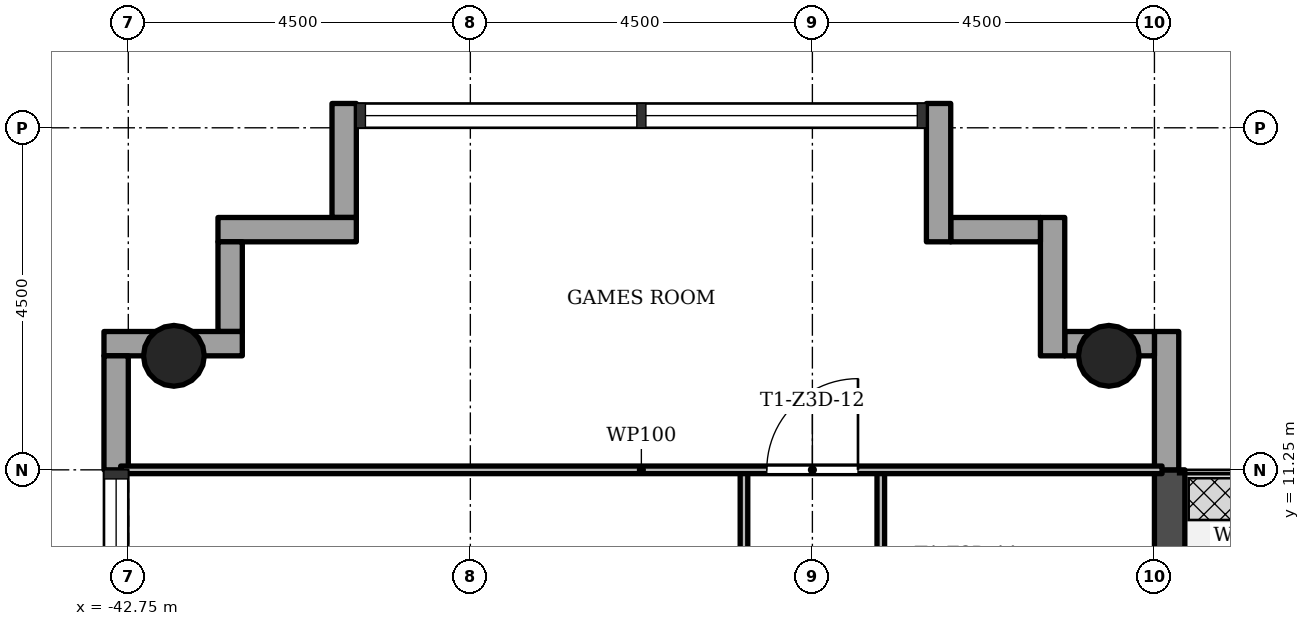
"""IFC4 building model, lengths in metres.
Left out: names, types, materials, properties, quantities, classifications, styles, units other than length and angle.
Written with IfcOpenShell. Run it as: python <this file> out.ifc"""

import sys

from ifc_helpers import new_model, si_unit, direction, frame, frame_2d, origin, origin_2d, place, context, subcontext, project, spatial, rectangle, hollow_circle, extrude, element, fill, save


model = new_model("IFC4")
c1 = context("Model", 3, precision=1e-05, world=origin(), true_north=direction((0.0, 1.0)))
c2 = subcontext(c1, "Body", "Model", "MODEL_VIEW")
j1 = project(units=[si_unit("LENGTHUNIT", "METRE"), si_unit("PLANEANGLEUNIT", "RADIAN")], contexts=[c1])
p1 = place(None, origin())
s1 = spatial("IfcSite", under=j1, at=p1, CompositionType="ELEMENT")
p2 = place(p1, origin())
s2 = spatial("IfcBuilding", under=s1, at=p2, CompositionType="ELEMENT")
p3 = place(p2, frame((0.0, 0.0, 174.5)))
s3 = spatial("IfcBuildingStorey", under=s2, at=p3, CompositionType="ELEMENT", Elevation=174.5)
for number, where, z_axis, x_axis in (
    (1, (-29.85, 12.75, 0.0), (0.0, 0.0, 1.0), (1.0, 0.0, 0.0)),
    (2, (-42.15, 12.75, 0.0), (0.0, 0.0, 1.0), (1.0, 0.0, 0.0)),
):
    element("IfcColumn", number, at=place(p3, frame(where, z_axis=z_axis, x_axis=x_axis)), inside=s3, PredefinedType="COLUMN", context=c2, shape_type="SweptSolid", body=[
        extrude(hollow_circle(Radius=0.4, WallThickness=0.028, at=origin_2d()), origin(), (0.0, 0.0, 1.0), 3.4),
    ])
p4 = place(p3, frame((-29.05, 6.75, -0.02), z_axis=(0.0, 0.0, 1.0), x_axis=(0.0, 1.0, 0.0)))
e3 = element("IfcWall", 3, at=p4, inside=s3, PredefinedType="STANDARD", context=c2, shape_type="SweptSolid", body=[
    extrude(rectangle(XDim=4.5, YDim=0.4, at=frame_2d((2.25, 0.0))), origin(), (0.0, 0.0, 1.0), 3.12),
])
p5 = place(p4, frame((1.35, 0.0, 0.02)))
e4 = element("IfcOpeningElement", 4, at=p5, cuts=e3, PredefinedType="OPENING", context=c2, shape_type="SweptSolid", body=[
    extrude(rectangle(XDim=1.8, YDim=2.1, at=frame_2d((0.9, 1.05))), frame((0.0, 0.21, 0.0), z_axis=(0.0, -1.0, 0.0), x_axis=(1.0, 0.0, 0.0)), (0.0, 0.0, 1.0), 0.42),
])
p6 = place(p3, frame((-29.09, 11.25, -0.3), z_axis=(0.0, 0.0, 1.0), x_axis=(0.0, 1.0, 0.0)))
e5 = element("IfcWall", 5, at=p6, inside=s3, PredefinedType="STANDARD", context=c2, shape_type="SweptSolid", body=[
    extrude(rectangle(XDim=1.82, YDim=0.32, at=frame_2d((0.91, 0.0))), origin(), (0.0, 0.0, 1.0), 3.4),
])
p7 = place(p3, frame((-29.25, 12.91, -0.3), z_axis=(0.0, 0.0, 1.0), x_axis=(-1.0, 0.0, 0.0)))
e6 = element("IfcWall", 6, at=p7, inside=s3, PredefinedType="STANDARD", context=c2, shape_type="SweptSolid", body=[
    extrude(rectangle(XDim=1.18, YDim=0.32, at=frame_2d((0.59, 0.0))), origin(), (0.0, 0.0, 1.0), 3.4),
])
p8 = place(p3, frame((-30.59, 12.75, -0.3), z_axis=(0.0, 0.0, 1.0), x_axis=(0.0, 1.0, 0.0)))
e7 = element("IfcWall", 7, at=p8, inside=s3, PredefinedType="STANDARD", context=c2, shape_type="SweptSolid", body=[
    extrude(rectangle(XDim=1.82, YDim=0.32, at=frame_2d((0.91, 0.0))), origin(), (0.0, 0.0, 1.0), 3.4),
])
p9 = place(p3, frame((-30.75, 14.41, -0.3), z_axis=(0.0, 0.0, 1.0), x_axis=(-1.0, 0.0, 0.0)))
e8 = element("IfcWall", 8, at=p9, inside=s3, PredefinedType="STANDARD", context=c2, shape_type="SweptSolid", body=[
    extrude(rectangle(XDim=1.18, YDim=0.32, at=frame_2d((0.59, 0.0))), origin(), (0.0, 0.0, 1.0), 3.4),
])
p10 = place(p3, frame((-32.09, 14.25, -0.3), z_axis=(0.0, 0.0, 1.0), x_axis=(0.0, 1.0, 0.0)))
e9 = element("IfcWall", 9, at=p10, inside=s3, PredefinedType="STANDARD", context=c2, shape_type="SweptSolid", body=[
    extrude(rectangle(XDim=1.82, YDim=0.32, at=frame_2d((0.91, 0.0))), origin(), (0.0, 0.0, 1.0), 3.4),
])
p11 = place(p3, frame((-39.91, 16.07, -0.3), z_axis=(0.0, 0.0, 1.0), x_axis=(0.0, -1.0, 0.0)))
e10 = element("IfcWall", 10, at=p11, inside=s3, PredefinedType="STANDARD", context=c2, shape_type="SweptSolid", body=[
    extrude(rectangle(XDim=1.5, YDim=0.32, at=frame_2d((0.75, 0.0))), origin(), (0.0, 0.0, 1.0), 3.4),
])
p12 = place(p3, frame((-39.75, 14.41, -0.3), z_axis=(0.0, 0.0, 1.0), x_axis=(-1.0, 0.0, 0.0)))
e11 = element("IfcWall", 11, at=p12, inside=s3, PredefinedType="STANDARD", context=c2, shape_type="SweptSolid", body=[
    extrude(rectangle(XDim=1.82, YDim=0.32, at=frame_2d((0.91, 0.0))), origin(), (0.0, 0.0, 1.0), 3.4),
])
p13 = place(p3, frame((-41.41, 14.25, -0.3), z_axis=(0.0, 0.0, 1.0), x_axis=(0.0, -1.0, 0.0)))
e12 = element("IfcWall", 12, at=p13, inside=s3, PredefinedType="STANDARD", context=c2, shape_type="SweptSolid", body=[
    extrude(rectangle(XDim=1.18, YDim=0.32, at=frame_2d((0.59, 0.0))), origin(), (0.0, 0.0, 1.0), 3.4),
])
p14 = place(p3, frame((-41.25, 12.91, -0.3), z_axis=(0.0, 0.0, 1.0), x_axis=(-1.0, 0.0, 0.0)))
e13 = element("IfcWall", 13, at=p14, inside=s3, PredefinedType="STANDARD", context=c2, shape_type="SweptSolid", body=[
    extrude(rectangle(XDim=1.82, YDim=0.32, at=frame_2d((0.91, 0.0))), origin(), (0.0, 0.0, 1.0), 3.4),
])
p15 = place(p3, frame((-42.91, 12.75, -0.3), z_axis=(0.0, 0.0, 1.0), x_axis=(0.0, -1.0, 0.0)))
e14 = element("IfcWall", 14, at=p15, inside=s3, PredefinedType="STANDARD", context=c2, shape_type="SweptSolid", body=[
    extrude(rectangle(XDim=1.5, YDim=0.32, at=frame_2d((0.75, 0.0))), origin(), (0.0, 0.0, 1.0), 3.4),
])
p16 = place(p3, frame((-34.65, 8.55, 0.0), z_axis=(0.0, 0.0, 1.0), x_axis=(0.0, 1.0, 0.0)))
e15 = element("IfcWall", 15, at=p16, inside=s3, PredefinedType="PARTITIONING", context=c2, shape_type="SweptSolid", body=[
    extrude(rectangle(XDim=2.7, YDim=0.1, at=frame_2d((1.35, 0.0))), origin(), (0.0, 0.0, 1.0), 3.0),
])
p17 = place(p16, frame((0.07, 0.0, 0.0)))
e16 = element("IfcOpeningElement", 16, at=p17, cuts=e15, PredefinedType="OPENING", context=c2, shape_type="SweptSolid", body=[
    extrude(rectangle(XDim=0.9, YDim=2.1, at=frame_2d((0.45, 1.05))), frame((0.0, 0.06, 0.0), z_axis=(0.0, -1.0, 0.0), x_axis=(1.0, 0.0, 0.0)), (0.0, 0.0, 1.0), 0.12),
])
p18 = place(p3, frame((-32.85, 6.75, 0.0), z_axis=(0.0, 0.0, 1.0), x_axis=(0.0, 1.0, 0.0)))
e17 = element("IfcWall", 17, at=p18, inside=s3, PredefinedType="PARTITIONING", context=c2, shape_type="SweptSolid", body=[
    extrude(rectangle(XDim=4.5, YDim=0.1, at=frame_2d((2.25, 0.0))), origin(), (0.0, 0.0, 1.0), 3.0),
])
p19 = place(p18, frame((1.8, 0.0, 0.0)))
e18 = element("IfcOpeningElement", 18, at=p19, cuts=e17, PredefinedType="OPENING", context=c2, shape_type="SweptSolid", body=[
    extrude(rectangle(XDim=0.9, YDim=2.1, at=frame_2d((0.45, 1.05))), frame((0.0, 0.06, 0.0), z_axis=(0.0, -1.0, 0.0), x_axis=(1.0, 0.0, 0.0)), (0.0, 0.0, 1.0), 0.12),
])
p20 = place(p3, frame((-42.85, 11.25, 0.0), z_axis=(0.0, 0.0, 1.0), x_axis=(1.0, 0.0, 0.0)))
e19 = element("IfcWall", 19, at=p20, inside=s3, PredefinedType="PARTITIONING", context=c2, shape_type="SweptSolid", body=[
    extrude(rectangle(XDim=13.7, YDim=0.1, at=frame_2d((6.85, 0.0))), origin(), (0.0, 0.0, 1.0), 3.0),
])
p21 = place(p20, frame((8.5, 0.0, 0.0)))
e20 = element("IfcOpeningElement", 20, at=p21, cuts=e19, PredefinedType="OPENING", context=c2, shape_type="SweptSolid", body=[
    extrude(rectangle(XDim=1.2, YDim=2.1, at=frame_2d((0.6, 1.05))), frame((0.0, 0.06, 0.0), z_axis=(0.0, -1.0, 0.0), x_axis=(1.0, 0.0, 0.0)), (0.0, 0.0, 1.0), 0.12),
])
p22 = place(p21, origin())
e21 = element("IfcDoor", 21, at=p22, inside=s3, OperationType="SINGLE_SWING_LEFT", PredefinedType="DOOR", context=c2, shape_type="SweptSolid", body=[
    extrude(rectangle(XDim=1.2, YDim=2.1, at=frame_2d((0.6, 1.05))), frame((0.0, 0.025, 0.0), z_axis=(0.0, -1.0, 0.0), x_axis=(1.0, 0.0, 0.0)), (0.0, 0.0, 1.0), 0.05),
])
fill(e20, e21)
save(model, sys.argv[1])
